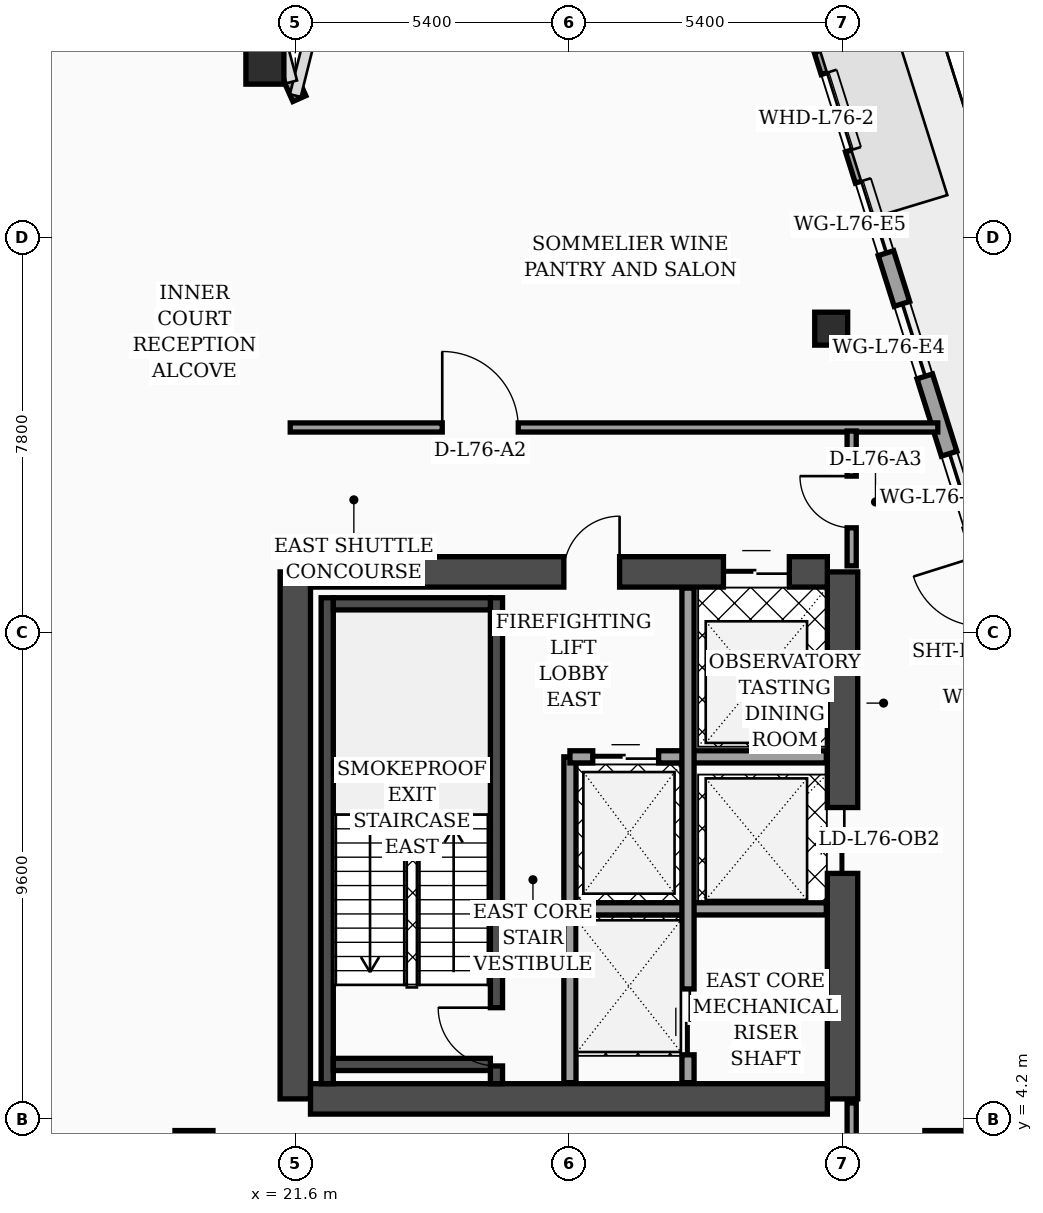
"""IFC4 building model, lengths in metres.
Left out: names, types, materials, properties, quantities, classifications, styles, units other than length and angle.
Written with IfcOpenShell. Run it as: python <this file> out.ifc"""

import sys

from ifc_helpers import new_model, si_unit, direction, frame, frame_2d, origin, origin_2d, place, context, subcontext, project, spatial, rectangle, hollow_rectangle, extrude, element, fill, save


model = new_model("IFC4")
c1 = context("Model", 3, precision=1e-05, world=origin(), true_north=direction((0.0, 1.0)))
c2 = subcontext(c1, "Body", "Model", "MODEL_VIEW")
j1 = project(units=[si_unit("LENGTHUNIT", "METRE"), si_unit("PLANEANGLEUNIT", "RADIAN")], contexts=[c1])
p1 = place(None, origin())
s1 = spatial("IfcSite", under=j1, at=p1, CompositionType="ELEMENT")
p2 = place(p1, origin())
s2 = spatial("IfcBuilding", under=s1, at=p2, CompositionType="ELEMENT")
p3 = place(p2, frame((0.0, 0.0, 307.0)))
s3 = spatial("IfcBuildingStorey", under=s2, at=p3, CompositionType="ELEMENT", Elevation=307.0)
p4 = place(p3, frame((21.6, 4.6, 0.0), z_axis=(0.0, 0.0, 1.0), x_axis=(0.0, 1.0, 0.0)))
e1 = element("IfcWall", 1, at=p4, inside=s3, PredefinedType="SHEAR", context=c2, shape_type="SweptSolid", body=[
    extrude(rectangle(XDim=10.4, YDim=0.6, at=frame_2d((5.2, 0.0))), origin(), (0.0, 0.0, 1.0), 4.26),
])
p5 = place(p3, frame((32.4, 4.6, 0.0), z_axis=(0.0, 0.0, 1.0), x_axis=(0.0, 1.0, 0.0)))
e2 = element("IfcWall", 2, at=p5, inside=s3, PredefinedType="SHEAR", context=c2, shape_type="SweptSolid", body=[
    extrude(rectangle(XDim=10.4, YDim=0.6, at=frame_2d((5.2, 0.0))), origin(), (0.0, 0.0, 1.0), 4.26),
])
p6 = place(p5, frame((4.45, 0.0, 0.0)))
e3 = element("IfcOpeningElement", 3, at=p6, cuts=e2, PredefinedType="OPENING", context=c2, shape_type="SweptSolid", body=[
    extrude(rectangle(XDim=1.3, YDim=2.35, at=frame_2d((0.65, 1.175))), frame((0.0, 0.31, 0.0), z_axis=(0.0, -1.0, 0.0), x_axis=(1.0, 0.0, 0.0)), (0.0, 0.0, 1.0), 0.62),
])
p7 = place(p3, frame((21.9, 15.0, 0.0), z_axis=(0.0, 0.0, 1.0), x_axis=(1.0, 0.0, 0.0)))
e4 = element("IfcWall", 4, at=p7, inside=s3, PredefinedType="SHEAR", context=c2, shape_type="SweptSolid", body=[
    extrude(rectangle(XDim=10.2, YDim=0.6, at=frame_2d((5.1, 0.0))), origin(), (0.0, 0.0, 1.0), 4.26),
])
p8 = place(p7, frame((5.0, 0.0, 0.0)))
e5 = element("IfcOpeningElement", 5, at=p8, cuts=e4, PredefinedType="OPENING", context=c2, shape_type="SweptSolid", body=[
    extrude(rectangle(XDim=1.1, YDim=2.2, at=frame_2d((0.55, 1.1))), frame((0.0, 0.31, 0.0), z_axis=(0.0, -1.0, 0.0), x_axis=(1.0, 0.0, 0.0)), (0.0, 0.0, 1.0), 0.62),
])
p9 = place(p7, frame((8.15, 0.0, 0.0)))
e6 = element("IfcOpeningElement", 6, at=p9, cuts=e4, PredefinedType="OPENING", context=c2, shape_type="SweptSolid", body=[
    extrude(rectangle(XDim=1.3, YDim=2.35, at=frame_2d((0.65, 1.175))), frame((0.0, 0.31, 0.0), z_axis=(0.0, -1.0, 0.0), x_axis=(1.0, 0.0, 0.0)), (0.0, 0.0, 1.0), 0.62),
])
p10 = place(p3, frame((21.9, 4.6, 0.0), z_axis=(0.0, 0.0, 1.0), x_axis=(1.0, 0.0, 0.0)))
e7 = element("IfcWall", 7, at=p10, inside=s3, PredefinedType="SHEAR", context=c2, shape_type="SweptSolid", body=[
    extrude(rectangle(XDim=10.2, YDim=0.6, at=frame_2d((5.1, 0.0))), origin(), (0.0, 0.0, 1.0), 4.26),
])
p11 = place(p3, frame((22.23, 4.9, 0.0), z_axis=(0.0, 0.0, 1.0), x_axis=(0.0, 1.0, 0.0)))
e8 = element("IfcWall", 8, at=p11, inside=s3, PredefinedType="SOLIDWALL", context=c2, shape_type="SweptSolid", body=[
    extrude(rectangle(XDim=9.59, YDim=0.24, at=frame_2d((4.795, 0.0))), origin(), (0.0, 0.0, 1.0), 4.26),
])
p12 = place(p3, frame((25.57, 4.9, 0.0), z_axis=(0.0, 0.0, 1.0), x_axis=(0.0, 1.0, 0.0)))
e9 = element("IfcWall", 9, at=p12, inside=s3, PredefinedType="SOLIDWALL", context=c2, shape_type="SweptSolid", body=[
    extrude(rectangle(XDim=9.59, YDim=0.24, at=frame_2d((4.795, 0.0))), origin(), (0.0, 0.0, 1.0), 4.26),
])
p13 = place(p12, frame((0.35, 0.0, 0.0)))
e10 = element("IfcOpeningElement", 10, at=p13, cuts=e9, PredefinedType="OPENING", context=c2, shape_type="SweptSolid", body=[
    extrude(rectangle(XDim=1.15, YDim=2.2, at=frame_2d((0.575, 1.1))), frame((0.0, 0.13, 0.0), z_axis=(0.0, -1.0, 0.0), x_axis=(1.0, 0.0, 0.0)), (0.0, 0.0, 1.0), 0.26),
])
for number, where, z_axis, x_axis in (
    (11, (22.35, 5.28, 0.0), (0.0, 0.0, 1.0), (1.0, 0.0, 0.0)),
    (12, (22.35, 14.37, 0.0), (0.0, 0.0, 1.0), (1.0, 0.0, 0.0)),
):
    element("IfcWall", number, at=place(p3, frame(where, z_axis=z_axis, x_axis=x_axis)), inside=s3, PredefinedType="SOLIDWALL", context=c2, shape_type="SweptSolid", body=[
        extrude(rectangle(XDim=3.1, YDim=0.24, at=frame_2d((1.55, 0.0))), origin(), (0.0, 0.0, 1.0), 4.26),
    ])
for number, where, z_axis, x_axis in (
    (13, (21.0, 25.0, 0.0), (0.0, 0.0, 1.0), (1.0, 0.0, 0.0)),
    (14, (19.6, 3.6, 0.0), (0.0, 0.0, 1.0), (1.0, 0.0, 0.0)),
    (15, (34.4, 3.6, 0.0), (0.0, 0.0, 1.0), (1.0, 0.0, 0.0)),
):
    element("IfcColumn", number, at=place(p3, frame(where, z_axis=z_axis, x_axis=x_axis)), inside=s3, PredefinedType="COLUMN", context=c2, shape_type="SweptSolid", body=[
        extrude(hollow_rectangle(XDim=0.75, YDim=0.75, WallThickness=0.032, at=origin_2d()), origin(), (0.0, 0.0, 1.0), 4.26),
    ])
p14 = place(p3, frame((32.176, 19.8, 0.0), z_axis=(0.0, 0.0, 1.0), x_axis=(1.0, 0.0, 0.0)))
e16 = element("IfcColumn", 16, at=p14, inside=s3, PredefinedType="COLUMN", context=c2, shape_type="SweptSolid", body=[
    extrude(hollow_rectangle(XDim=0.65, YDim=0.65, WallThickness=0.028, at=origin_2d()), origin(), (0.0, 0.0, 1.0), 4.26),
])
p15 = place(p3, frame((21.68, 24.34, 0.0), z_axis=(0.0, 0.0, 1.0), x_axis=(-0.40758134973, 0.913168901875, 0.0)))
e17 = element("IfcWall", 17, at=p15, inside=s3, PredefinedType="SOLIDWALL", context=c2, shape_type="SweptSolid", body=[
    extrude(rectangle(XDim=0.471, YDim=0.28, at=frame_2d((0.235, 0.0))), origin(), (0.0, 0.0, 1.0), 4.26),
])
p16 = place(p3, frame((38.23, 5.505, 0.0), z_axis=(0.0, 0.0, 1.0), x_axis=(-0.300509063924, 0.953778958931, 0.0)))
e18 = element("IfcWall", 18, at=p16, inside=s3, PredefinedType="SOLIDWALL", context=c2, shape_type="SweptSolid", body=[
    extrude(rectangle(XDim=30.814, YDim=0.32, at=frame_2d((15.407, 0.0))), origin(), (0.0, 0.0, 1.0), 4.26),
])
p17 = place(p16, frame((8.9, 0.0, 0.0)))
e19 = element("IfcOpeningElement", 19, at=p17, cuts=e18, PredefinedType="OPENING", context=c2, shape_type="SweptSolid", body=[
    extrude(rectangle(XDim=1.4, YDim=2.25, at=frame_2d((0.7, 1.125))), frame((0.0, 0.17, 0.0), z_axis=(0.0, -1.0, 0.0), x_axis=(1.0, 0.0, 0.0)), (0.0, 0.0, 1.0), 0.34),
])
p18 = place(p16, frame((4.437, 0.0, 0.7)))
e20 = element("IfcOpeningElement", 20, at=p18, cuts=e18, PredefinedType="OPENING", context=c2, shape_type="SweptSolid", body=[
    extrude(rectangle(XDim=1.6, YDim=1.65, at=frame_2d((0.8, 0.825))), frame((0.0, 0.17, 0.0), z_axis=(0.0, -1.0, 0.0), x_axis=(1.0, 0.0, 0.0)), (0.0, 0.0, 1.0), 0.34),
])
p19 = place(p16, frame((18.696, 0.0, 0.7)))
e21 = element("IfcOpeningElement", 21, at=p19, cuts=e18, PredefinedType="OPENING", context=c2, shape_type="SweptSolid", body=[
    extrude(rectangle(XDim=1.6, YDim=1.65, at=frame_2d((0.8, 0.825))), frame((0.0, 0.17, 0.0), z_axis=(0.0, -1.0, 0.0), x_axis=(1.0, 0.0, 0.0)), (0.0, 0.0, 1.0), 0.34),
])
p20 = place(p16, frame((1.6, 0.0, 0.75)))
e22 = element("IfcOpeningElement", 22, at=p20, cuts=e18, PredefinedType="OPENING", context=c2, shape_type="SweptSolid", body=[
    extrude(rectangle(XDim=1.5, YDim=1.6, at=frame_2d((0.75, 0.8))), frame((0.0, 0.17, 0.0), z_axis=(0.0, -1.0, 0.0), x_axis=(1.0, 0.0, 0.0)), (0.0, 0.0, 1.0), 0.34),
])
p21 = place(p16, frame((6.75, 0.0, 0.75)))
e23 = element("IfcOpeningElement", 23, at=p21, cuts=e18, PredefinedType="OPENING", context=c2, shape_type="SweptSolid", body=[
    extrude(rectangle(XDim=1.5, YDim=1.6, at=frame_2d((0.75, 0.8))), frame((0.0, 0.17, 0.0), z_axis=(0.0, -1.0, 0.0), x_axis=(1.0, 0.0, 0.0)), (0.0, 0.0, 1.0), 0.34),
])
p22 = place(p16, frame((10.9, 0.0, 0.75)))
e24 = element("IfcOpeningElement", 24, at=p22, cuts=e18, PredefinedType="OPENING", context=c2, shape_type="SweptSolid", body=[
    extrude(rectangle(XDim=1.5, YDim=1.6, at=frame_2d((0.75, 0.8))), frame((0.0, 0.17, 0.0), z_axis=(0.0, -1.0, 0.0), x_axis=(1.0, 0.0, 0.0)), (0.0, 0.0, 1.0), 0.34),
])
p23 = place(p16, frame((14.0, 0.0, 0.75)))
e25 = element("IfcOpeningElement", 25, at=p23, cuts=e18, PredefinedType="OPENING", context=c2, shape_type="SweptSolid", body=[
    extrude(rectangle(XDim=1.5, YDim=1.6, at=frame_2d((0.75, 0.8))), frame((0.0, 0.17, 0.0), z_axis=(0.0, -1.0, 0.0), x_axis=(1.0, 0.0, 0.0)), (0.0, 0.0, 1.0), 0.34),
])
p24 = place(p16, frame((16.55, 0.0, 0.75)))
e26 = element("IfcOpeningElement", 26, at=p24, cuts=e18, PredefinedType="OPENING", context=c2, shape_type="SweptSolid", body=[
    extrude(rectangle(XDim=1.5, YDim=1.6, at=frame_2d((0.75, 0.8))), frame((0.0, 0.17, 0.0), z_axis=(0.0, -1.0, 0.0), x_axis=(1.0, 0.0, 0.0)), (0.0, 0.0, 1.0), 0.34),
])
p25 = place(p16, frame((20.75, 0.0, 0.75)))
e27 = element("IfcOpeningElement", 27, at=p25, cuts=e18, PredefinedType="OPENING", context=c2, shape_type="SweptSolid", body=[
    extrude(rectangle(XDim=1.5, YDim=1.6, at=frame_2d((0.75, 0.8))), frame((0.0, 0.17, 0.0), z_axis=(0.0, -1.0, 0.0), x_axis=(1.0, 0.0, 0.0)), (0.0, 0.0, 1.0), 0.34),
])
p26 = place(p16, frame((23.3, 0.0, 0.75)))
e28 = element("IfcOpeningElement", 28, at=p26, cuts=e18, PredefinedType="OPENING", context=c2, shape_type="SweptSolid", body=[
    extrude(rectangle(XDim=1.5, YDim=1.6, at=frame_2d((0.75, 0.8))), frame((0.0, 0.17, 0.0), z_axis=(0.0, -1.0, 0.0), x_axis=(1.0, 0.0, 0.0)), (0.0, 0.0, 1.0), 0.34),
])
p27 = place(p16, frame((26.4, 0.0, 0.75)))
e29 = element("IfcOpeningElement", 29, at=p27, cuts=e18, PredefinedType="OPENING", context=c2, shape_type="SweptSolid", body=[
    extrude(rectangle(XDim=1.5, YDim=1.6, at=frame_2d((0.75, 0.8))), frame((0.0, 0.17, 0.0), z_axis=(0.0, -1.0, 0.0), x_axis=(1.0, 0.0, 0.0)), (0.0, 0.0, 1.0), 0.34),
])
p28 = place(p3, frame((27.02, 4.92, 0.0), z_axis=(0.0, 0.0, 1.0), x_axis=(0.0, 1.0, 0.0)))
e30 = element("IfcWall", 30, at=p28, inside=s3, PredefinedType="SOLIDWALL", context=c2, shape_type="SweptSolid", body=[
    extrude(rectangle(XDim=6.43, YDim=0.24, at=frame_2d((3.215, 0.0))), origin(), (0.0, 0.0, 1.0), 4.26),
])
p29 = place(p3, frame((27.02, 11.35, 0.0), z_axis=(0.0, 0.0, 1.0), x_axis=(1.0, 0.0, 0.0)))
e31 = element("IfcWall", 31, at=p29, inside=s3, PredefinedType="SOLIDWALL", context=c2, shape_type="SweptSolid", body=[
    extrude(rectangle(XDim=5.06, YDim=0.24, at=frame_2d((2.53, 0.0))), origin(), (0.0, 0.0, 1.0), 4.26),
])
p30 = place(p29, frame((0.45, 0.0, 0.0)))
e32 = element("IfcOpeningElement", 32, at=p30, cuts=e31, PredefinedType="OPENING", context=c2, shape_type="SweptSolid", body=[
    extrude(rectangle(XDim=1.3, YDim=2.35, at=frame_2d((0.65, 1.175))), frame((0.0, 0.13, 0.0), z_axis=(0.0, -1.0, 0.0), x_axis=(1.0, 0.0, 0.0)), (0.0, 0.0, 1.0), 0.26),
])
p31 = place(p3, frame((27.02, 8.35, 0.0), z_axis=(0.0, 0.0, 1.0), x_axis=(1.0, 0.0, 0.0)))
e33 = element("IfcWall", 33, at=p31, inside=s3, PredefinedType="SOLIDWALL", context=c2, shape_type="SweptSolid", body=[
    extrude(rectangle(XDim=5.06, YDim=0.24, at=frame_2d((2.53, 0.0))), origin(), (0.0, 0.0, 1.0), 4.26),
])
p32 = place(p3, frame((29.35, 4.92, 0.0), z_axis=(0.0, 0.0, 1.0), x_axis=(0.0, 1.0, 0.0)))
e34 = element("IfcWall", 34, at=p32, inside=s3, PredefinedType="SOLIDWALL", context=c2, shape_type="SweptSolid", body=[
    extrude(rectangle(XDim=9.76, YDim=0.24, at=frame_2d((4.88, 0.0))), origin(), (0.0, 0.0, 1.0), 4.26),
])
p33 = place(p32, frame((0.55, 0.0, 0.0)))
e35 = element("IfcOpeningElement", 35, at=p33, cuts=e34, PredefinedType="OPENING", context=c2, shape_type="SweptSolid", body=[
    extrude(rectangle(XDim=1.3, YDim=2.35, at=frame_2d((0.65, 1.175))), frame((0.0, 0.13, 0.0), z_axis=(0.0, -1.0, 0.0), x_axis=(1.0, 0.0, 0.0)), (0.0, 0.0, 1.0), 0.26),
])
p34 = place(p3, frame((21.5, 17.85, 0.0), z_axis=(0.0, 0.0, 1.0), x_axis=(1.0, 0.0, 0.0)))
e36 = element("IfcWall", 36, at=p34, inside=s3, PredefinedType="PARTITIONING", context=c2, shape_type="SweptSolid", body=[
    extrude(rectangle(XDim=12.78, YDim=0.18, at=frame_2d((6.39, 0.0))), origin(), (0.0, 0.0, 1.0), 3.69),
])
p35 = place(p34, frame((3.0, 0.0, 0.0)))
e37 = element("IfcOpeningElement", 37, at=p35, cuts=e36, PredefinedType="OPENING", context=c2, shape_type="SweptSolid", body=[
    extrude(rectangle(XDim=1.5, YDim=2.22, at=frame_2d((0.75, 1.11))), frame((0.0, 0.1, 0.0), z_axis=(0.0, -1.0, 0.0), x_axis=(1.0, 0.0, 0.0)), (0.0, 0.0, 1.0), 0.2),
])
p36 = place(p3, frame((32.58, 15.12, 0.0), z_axis=(0.0, 0.0, 1.0), x_axis=(0.0, 1.0, 0.0)))
e38 = element("IfcWall", 38, at=p36, inside=s3, PredefinedType="PARTITIONING", context=c2, shape_type="SweptSolid", body=[
    extrude(rectangle(XDim=2.66, YDim=0.18, at=frame_2d((1.33, 0.0))), origin(), (0.0, 0.0, 1.0), 3.69),
])
p37 = place(p36, frame((0.75, 0.0, 0.0)))
e39 = element("IfcOpeningElement", 39, at=p37, cuts=e38, PredefinedType="OPENING", context=c2, shape_type="SweptSolid", body=[
    extrude(rectangle(XDim=1.02, YDim=2.2, at=frame_2d((0.51, 1.1))), frame((0.0, 0.1, 0.0), z_axis=(0.0, -1.0, 0.0), x_axis=(1.0, 0.0, 0.0)), (0.0, 0.0, 1.0), 0.2),
])
p38 = place(p3, frame((32.58, 2.6, 0.0), z_axis=(0.0, 0.0, 1.0), x_axis=(0.0, 1.0, 0.0)))
e40 = element("IfcWall", 40, at=p38, inside=s3, PredefinedType="PARTITIONING", context=c2, shape_type="SweptSolid", body=[
    extrude(rectangle(XDim=1.92, YDim=0.18, at=frame_2d((0.96, 0.0))), origin(), (0.0, 0.0, 1.0), 3.69),
])
p39 = place(p19, origin())
e41 = element("IfcWindow", 41, at=p39, inside=s3, PartitioningType="SINGLE_PANEL", PredefinedType="WINDOW", context=c2, shape_type="SweptSolid", body=[
    extrude(rectangle(XDim=1.6, YDim=1.65, at=frame_2d((0.8, 0.825))), frame((0.0, 0.03, 0.0), z_axis=(0.0, -1.0, 0.0), x_axis=(1.0, 0.0, 0.0)), (0.0, 0.0, 1.0), 0.06),
])
fill(e21, e41)
p40 = place(p22, origin())
e42 = element("IfcWindow", 42, at=p40, inside=s3, PartitioningType="SINGLE_PANEL", PredefinedType="WINDOW", context=c2, shape_type="SweptSolid", body=[
    extrude(rectangle(XDim=1.5, YDim=1.6, at=frame_2d((0.75, 0.8))), frame((0.0, 0.03, 0.0), z_axis=(0.0, -1.0, 0.0), x_axis=(1.0, 0.0, 0.0)), (0.0, 0.0, 1.0), 0.06),
])
fill(e24, e42)
p41 = place(p23, origin())
e43 = element("IfcWindow", 43, at=p41, inside=s3, PartitioningType="SINGLE_PANEL", PredefinedType="WINDOW", context=c2, shape_type="SweptSolid", body=[
    extrude(rectangle(XDim=1.5, YDim=1.6, at=frame_2d((0.75, 0.8))), frame((0.0, 0.03, 0.0), z_axis=(0.0, -1.0, 0.0), x_axis=(1.0, 0.0, 0.0)), (0.0, 0.0, 1.0), 0.06),
])
fill(e25, e43)
p42 = place(p24, origin())
e44 = element("IfcWindow", 44, at=p42, inside=s3, PartitioningType="SINGLE_PANEL", PredefinedType="WINDOW", context=c2, shape_type="SweptSolid", body=[
    extrude(rectangle(XDim=1.5, YDim=1.6, at=frame_2d((0.75, 0.8))), frame((0.0, 0.03, 0.0), z_axis=(0.0, -1.0, 0.0), x_axis=(1.0, 0.0, 0.0)), (0.0, 0.0, 1.0), 0.06),
])
fill(e26, e44)
p43 = place(p30, origin())
e45 = element("IfcDoor", 45, at=p43, inside=s3, OperationType="DOUBLE_DOOR_SLIDING", PredefinedType="DOOR", context=c2, shape_type="SweptSolid", body=[
    extrude(rectangle(XDim=1.3, YDim=2.35, at=frame_2d((0.65, 1.175))), frame((0.0, 0.025, 0.0), z_axis=(0.0, -1.0, 0.0), x_axis=(1.0, 0.0, 0.0)), (0.0, 0.0, 1.0), 0.05),
])
fill(e32, e45)
p44 = place(p33, origin())
e46 = element("IfcDoor", 46, at=p44, inside=s3, OperationType="DOUBLE_DOOR_SLIDING", PredefinedType="DOOR", context=c2, shape_type="SweptSolid", body=[
    extrude(rectangle(XDim=1.3, YDim=2.35, at=frame_2d((0.65, 1.175))), frame((0.0, 0.025, 0.0), z_axis=(0.0, -1.0, 0.0), x_axis=(1.0, 0.0, 0.0)), (0.0, 0.0, 1.0), 0.05),
])
fill(e35, e46)
p45 = place(p35, origin())
e47 = element("IfcDoor", 47, at=p45, inside=s3, OperationType="SINGLE_SWING_LEFT", PredefinedType="DOOR", context=c2, shape_type="SweptSolid", body=[
    extrude(rectangle(XDim=1.5, YDim=2.22, at=frame_2d((0.75, 1.11))), frame((0.0, 0.025, 0.0), z_axis=(0.0, -1.0, 0.0), x_axis=(1.0, 0.0, 0.0)), (0.0, 0.0, 1.0), 0.05),
])
fill(e37, e47)
p46 = place(p37, origin())
e48 = element("IfcDoor", 48, at=p46, inside=s3, OperationType="SINGLE_SWING_RIGHT", PredefinedType="DOOR", context=c2, shape_type="SweptSolid", body=[
    extrude(rectangle(XDim=1.02, YDim=2.2, at=frame_2d((0.51, 1.1))), frame((0.0, 0.025, 0.0), z_axis=(0.0, -1.0, 0.0), x_axis=(1.0, 0.0, 0.0)), (0.0, 0.0, 1.0), 0.05),
])
fill(e39, e48)
p47 = place(p13, origin())
e49 = element("IfcDoor", 49, at=p47, inside=s3, OperationType="SINGLE_SWING_RIGHT", PredefinedType="DOOR", context=c2, shape_type="SweptSolid", body=[
    extrude(rectangle(XDim=1.15, YDim=2.2, at=frame_2d((0.575, 1.1))), frame((0.0, 0.025, 0.0), z_axis=(0.0, -1.0, 0.0), x_axis=(1.0, 0.0, 0.0)), (0.0, 0.0, 1.0), 0.05),
])
fill(e10, e49)
p48 = place(p8, origin())
e50 = element("IfcDoor", 50, at=p48, inside=s3, OperationType="SINGLE_SWING_RIGHT", PredefinedType="DOOR", context=c2, shape_type="SweptSolid", body=[
    extrude(rectangle(XDim=1.1, YDim=2.2, at=frame_2d((0.55, 1.1))), frame((0.0, 0.025, 0.0), z_axis=(0.0, -1.0, 0.0), x_axis=(1.0, 0.0, 0.0)), (0.0, 0.0, 1.0), 0.05),
])
fill(e5, e50)
p49 = place(p9, origin())
e51 = element("IfcDoor", 51, at=p49, inside=s3, OperationType="DOUBLE_DOOR_SLIDING", PredefinedType="DOOR", context=c2, shape_type="SweptSolid", body=[
    extrude(rectangle(XDim=1.3, YDim=2.35, at=frame_2d((0.65, 1.175))), frame((0.0, 0.025, 0.0), z_axis=(0.0, -1.0, 0.0), x_axis=(1.0, 0.0, 0.0)), (0.0, 0.0, 1.0), 0.05),
])
fill(e6, e51)
p50 = place(p6, origin())
e52 = element("IfcDoor", 52, at=p50, inside=s3, OperationType="DOUBLE_DOOR_SLIDING", PredefinedType="DOOR", context=c2, shape_type="SweptSolid", body=[
    extrude(rectangle(XDim=1.3, YDim=2.35, at=frame_2d((0.65, 1.175))), frame((0.0, 0.025, 0.0), z_axis=(0.0, -1.0, 0.0), x_axis=(1.0, 0.0, 0.0)), (0.0, 0.0, 1.0), 0.05),
])
fill(e3, e52)
save(model, sys.argv[1])
